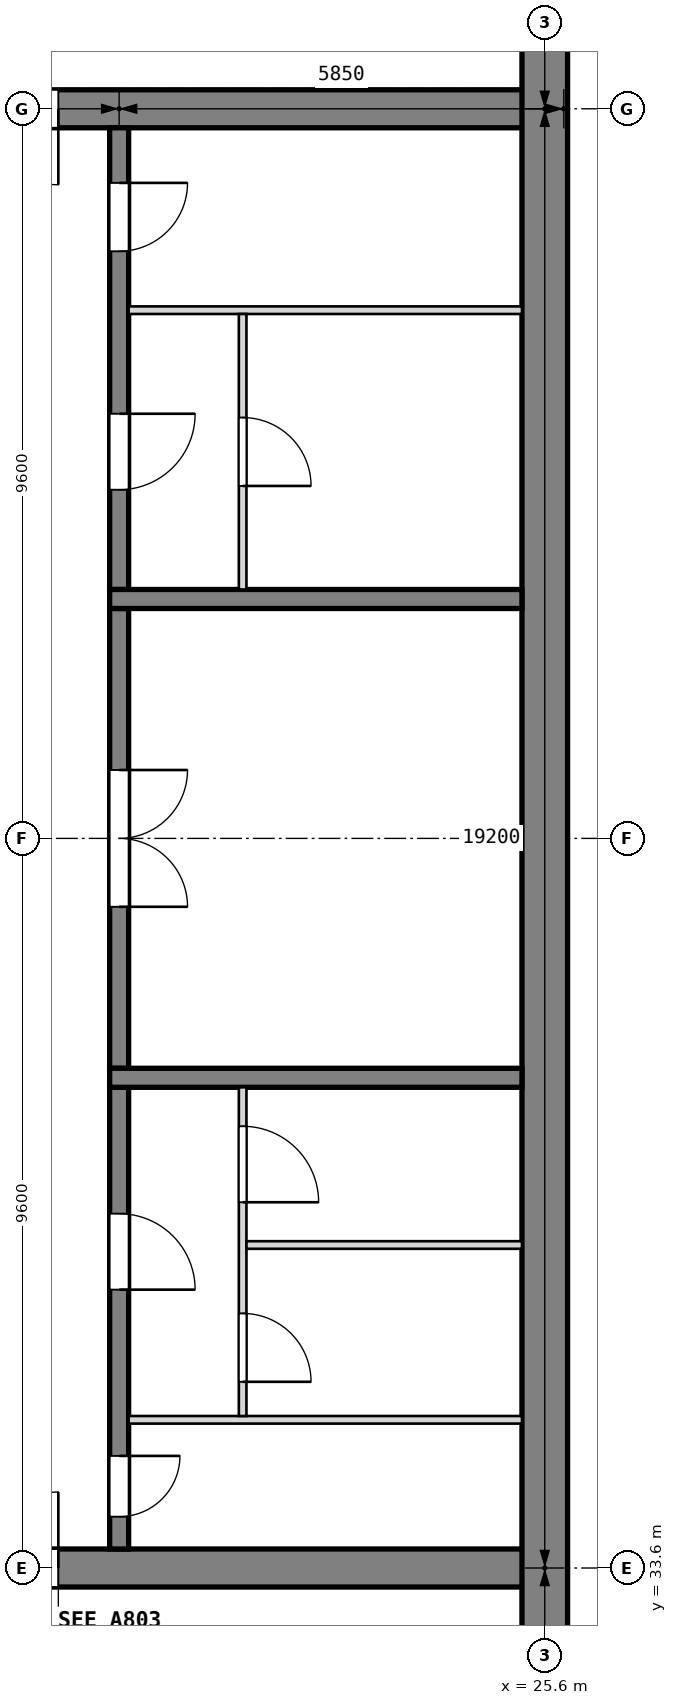
"""IFC4 building model, lengths in metres.
Left out: names, types, materials, properties, quantities, classifications, styles, units other than length and angle.
Written with IfcOpenShell. Run it as: python <this file> out.ifc"""

import sys

from ifc_helpers import new_model, si_unit, direction, frame, frame_2d, origin, place, context, subcontext, project, spatial, rectangle, extrude, element, fill, save


model = new_model("IFC4")
c1 = context("Model", 3, precision=1e-05, world=origin(), true_north=direction((0.0, 1.0)))
c2 = subcontext(c1, "Body", "Model", "MODEL_VIEW")
j1 = project(units=[si_unit("LENGTHUNIT", "METRE"), si_unit("PLANEANGLEUNIT", "RADIAN")], contexts=[c1])
p1 = place(None, origin())
s1 = spatial("IfcSite", under=j1, at=p1, CompositionType="ELEMENT")
p2 = place(p1, origin())
s2 = spatial("IfcBuilding", under=s1, at=p2, CompositionType="ELEMENT")
p3 = place(p2, frame((0.0, 0.0, 4.2)))
s3 = spatial("IfcBuildingStorey", under=s2, at=p3, CompositionType="ELEMENT", Elevation=4.2)
p4 = place(p3, frame((12.55, 52.8, 0.0), z_axis=(0.0, 0.0, 1.0), x_axis=(1.0, 0.0, 0.0)))
e1 = element("IfcWall", 1, at=p4, inside=s3, PredefinedType="SHEAR", context=c2, shape_type="SweptSolid", body=[
    extrude(rectangle(XDim=13.3, YDim=0.5, at=frame_2d((6.65, 0.0))), origin(), (0.0, 0.0, 1.0), 4.2),
])
p5 = place(p4, frame((4.65, 0.0, 0.0)))
e2 = element("IfcOpeningElement", 2, at=p5, cuts=e1, PredefinedType="OPENING", context=c2, shape_type="SweptSolid", body=[
    extrude(rectangle(XDim=2.0, YDim=2.1, at=frame_2d((1.0, 1.05))), frame((0.0, 0.26, 0.0), z_axis=(0.0, -1.0, 0.0), x_axis=(1.0, 0.0, 0.0)), (0.0, 0.0, 1.0), 0.52),
])
p6 = place(p3, frame((12.55, 33.6, 0.0), z_axis=(0.0, 0.0, 1.0), x_axis=(1.0, 0.0, 0.0)))
e3 = element("IfcWall", 3, at=p6, inside=s3, PredefinedType="SHEAR", context=c2, shape_type="SweptSolid", body=[
    extrude(rectangle(XDim=13.3, YDim=0.5, at=frame_2d((6.65, 0.0))), origin(), (0.0, 0.0, 1.0), 4.2),
])
p7 = place(p6, frame((4.65, 0.0, 0.0)))
e4 = element("IfcOpeningElement", 4, at=p7, cuts=e3, PredefinedType="OPENING", context=c2, shape_type="SweptSolid", body=[
    extrude(rectangle(XDim=2.0, YDim=2.1, at=frame_2d((1.0, 1.05))), frame((0.0, 0.26, 0.0), z_axis=(0.0, -1.0, 0.0), x_axis=(1.0, 0.0, 0.0)), (0.0, 0.0, 1.0), 0.52),
])
p8 = place(p3, frame((25.6, 28.8, 0.0), z_axis=(0.0, 0.0, 1.0), x_axis=(0.0, 1.0, 0.0)))
e5 = element("IfcWall", 5, at=p8, inside=s3, PredefinedType="SHEAR", context=c2, shape_type="SweptSolid", body=[
    extrude(rectangle(XDim=28.8, YDim=0.6, at=frame_2d((14.4, 0.0))), origin(), (0.0, 0.0, 1.0), 4.2),
])
p9 = place(p3, frame((20.0, 33.85, 0.0), z_axis=(0.0, 0.0, 1.0), x_axis=(0.0, 1.0, 0.0)))
e6 = element("IfcWall", 6, at=p9, inside=s3, PredefinedType="SOLIDWALL", context=c2, shape_type="SweptSolid", body=[
    extrude(rectangle(XDim=6.075, YDim=0.25, at=frame_2d((3.038, 0.0))), origin(), (0.0, 0.0, 1.0), 3.9),
])
p10 = place(p9, frame((0.425, 0.0, 0.0)))
e7 = element("IfcOpeningElement", 7, at=p10, cuts=e6, PredefinedType="OPENING", context=c2, shape_type="SweptSolid", body=[
    extrude(rectangle(XDim=0.8, YDim=2.1, at=frame_2d((0.4, 1.05))), frame((0.0, 0.135, 0.0), z_axis=(0.0, -1.0, 0.0), x_axis=(1.0, 0.0, 0.0)), (0.0, 0.0, 1.0), 0.27),
])
p11 = place(p9, frame((3.413, 0.0, 0.0)))
e8 = element("IfcOpeningElement", 8, at=p11, cuts=e6, PredefinedType="OPENING", context=c2, shape_type="SweptSolid", body=[
    extrude(rectangle(XDim=1.0, YDim=2.1, at=frame_2d((0.5, 1.05))), frame((0.0, 0.135, 0.0), z_axis=(0.0, -1.0, 0.0), x_axis=(1.0, 0.0, 0.0)), (0.0, 0.0, 1.0), 0.27),
])
p12 = place(p3, frame((20.0, 40.175, 0.0), z_axis=(0.0, 0.0, 1.0), x_axis=(0.0, 1.0, 0.0)))
e9 = element("IfcWall", 9, at=p12, inside=s3, PredefinedType="SOLIDWALL", context=c2, shape_type="SweptSolid", body=[
    extrude(rectangle(XDim=6.05, YDim=0.25, at=frame_2d((3.025, 0.0))), origin(), (0.0, 0.0, 1.0), 3.9),
])
p13 = place(p12, frame((2.125, 0.0, 0.0)))
e10 = element("IfcOpeningElement", 10, at=p13, cuts=e9, PredefinedType="OPENING", context=c2, shape_type="SweptSolid", body=[
    extrude(rectangle(XDim=1.8, YDim=2.1, at=frame_2d((0.9, 1.05))), frame((0.0, 0.135, 0.0), z_axis=(0.0, -1.0, 0.0), x_axis=(1.0, 0.0, 0.0)), (0.0, 0.0, 1.0), 0.27),
])
p14 = place(p3, frame((20.0, 46.475, 0.0), z_axis=(0.0, 0.0, 1.0), x_axis=(0.0, 1.0, 0.0)))
e11 = element("IfcWall", 11, at=p14, inside=s3, PredefinedType="SOLIDWALL", context=c2, shape_type="SweptSolid", body=[
    extrude(rectangle(XDim=6.075, YDim=0.25, at=frame_2d((3.038, 0.0))), origin(), (0.0, 0.0, 1.0), 3.9),
])
p15 = place(p14, frame((1.312, 0.0, 0.0)))
e12 = element("IfcOpeningElement", 12, at=p15, cuts=e11, PredefinedType="OPENING", context=c2, shape_type="SweptSolid", body=[
    extrude(rectangle(XDim=1.0, YDim=2.1, at=frame_2d((0.5, 1.05))), frame((0.0, 0.135, 0.0), z_axis=(0.0, -1.0, 0.0), x_axis=(1.0, 0.0, 0.0)), (0.0, 0.0, 1.0), 0.27),
])
p16 = place(p14, frame((4.45, 0.0, 0.0)))
e13 = element("IfcOpeningElement", 13, at=p16, cuts=e11, PredefinedType="OPENING", context=c2, shape_type="SweptSolid", body=[
    extrude(rectangle(XDim=0.9, YDim=2.1, at=frame_2d((0.45, 1.05))), frame((0.0, 0.135, 0.0), z_axis=(0.0, -1.0, 0.0), x_axis=(1.0, 0.0, 0.0)), (0.0, 0.0, 1.0), 0.27),
])
for number, where, z_axis, x_axis in (
    (14, (19.875, 40.05, 0.0), (0.0, 0.0, 1.0), (1.0, 0.0, 0.0)),
    (15, (19.875, 46.35, 0.0), (0.0, 0.0, 1.0), (1.0, 0.0, 0.0)),
):
    element("IfcWall", number, at=place(p3, frame(where, z_axis=z_axis, x_axis=x_axis)), inside=s3, PredefinedType="SOLIDWALL", context=c2, shape_type="SweptSolid", body=[
        extrude(rectangle(XDim=5.425, YDim=0.25, at=frame_2d((2.712, 0.0))), origin(), (0.0, 0.0, 1.0), 3.9),
    ])
p17 = place(p3, frame((20.125, 35.55, 0.0), z_axis=(0.0, 0.0, 1.0), x_axis=(1.0, 0.0, 0.0)))
e16 = element("IfcWall", 16, at=p17, inside=s3, PredefinedType="PARTITIONING", context=c2, shape_type="SweptSolid", body=[
    extrude(rectangle(XDim=5.175, YDim=0.1, at=frame_2d((2.587, 0.0))), origin(), (0.0, 0.0, 1.0), 3.9),
])
p18 = place(p3, frame((21.625, 35.6, 0.0), z_axis=(0.0, 0.0, 1.0), x_axis=(0.0, 1.0, 0.0)))
e17 = element("IfcWall", 17, at=p18, inside=s3, PredefinedType="PARTITIONING", context=c2, shape_type="SweptSolid", body=[
    extrude(rectangle(XDim=4.325, YDim=0.1, at=frame_2d((2.163, 0.0))), origin(), (0.0, 0.0, 1.0), 3.9),
])
p19 = place(p18, frame((0.45, 0.0, 0.0)))
e18 = element("IfcOpeningElement", 18, at=p19, cuts=e17, PredefinedType="OPENING", context=c2, shape_type="SweptSolid", body=[
    extrude(rectangle(XDim=0.9, YDim=2.1, at=frame_2d((0.45, 1.05))), frame((0.0, 0.06, 0.0), z_axis=(0.0, -1.0, 0.0), x_axis=(1.0, 0.0, 0.0)), (0.0, 0.0, 1.0), 0.12),
])
p20 = place(p18, frame((2.812, 0.0, 0.0)))
e19 = element("IfcOpeningElement", 19, at=p20, cuts=e17, PredefinedType="OPENING", context=c2, shape_type="SweptSolid", body=[
    extrude(rectangle(XDim=1.0, YDim=2.1, at=frame_2d((0.5, 1.05))), frame((0.0, 0.06, 0.0), z_axis=(0.0, -1.0, 0.0), x_axis=(1.0, 0.0, 0.0)), (0.0, 0.0, 1.0), 0.12),
])
p21 = place(p3, frame((21.675, 37.85, 0.0), z_axis=(0.0, 0.0, 1.0), x_axis=(1.0, 0.0, 0.0)))
e20 = element("IfcWall", 20, at=p21, inside=s3, PredefinedType="PARTITIONING", context=c2, shape_type="SweptSolid", body=[
    extrude(rectangle(XDim=3.625, YDim=0.1, at=frame_2d((1.812, 0.0))), origin(), (0.0, 0.0, 1.0), 3.9),
])
p22 = place(p3, frame((20.125, 50.15, 0.0), z_axis=(0.0, 0.0, 1.0), x_axis=(1.0, 0.0, 0.0)))
e21 = element("IfcWall", 21, at=p22, inside=s3, PredefinedType="PARTITIONING", context=c2, shape_type="SweptSolid", body=[
    extrude(rectangle(XDim=5.175, YDim=0.1, at=frame_2d((2.587, 0.0))), origin(), (0.0, 0.0, 1.0), 3.9),
])
p23 = place(p3, frame((21.625, 46.475, 0.0), z_axis=(0.0, 0.0, 1.0), x_axis=(0.0, 1.0, 0.0)))
e22 = element("IfcWall", 22, at=p23, inside=s3, PredefinedType="PARTITIONING", context=c2, shape_type="SweptSolid", body=[
    extrude(rectangle(XDim=3.625, YDim=0.1, at=frame_2d((1.812, 0.0))), origin(), (0.0, 0.0, 1.0), 3.9),
])
p24 = place(p23, frame((1.363, 0.0, 0.0)))
e23 = element("IfcOpeningElement", 23, at=p24, cuts=e22, PredefinedType="OPENING", context=c2, shape_type="SweptSolid", body=[
    extrude(rectangle(XDim=0.9, YDim=2.1, at=frame_2d((0.45, 1.05))), frame((0.0, 0.06, 0.0), z_axis=(0.0, -1.0, 0.0), x_axis=(1.0, 0.0, 0.0)), (0.0, 0.0, 1.0), 0.12),
])
p25 = place(p13, frame((1.8, 0.0, 0.0), z_axis=(0.0, 0.0, 1.0), x_axis=(-1.0, 0.0, 0.0)))
e24 = element("IfcDoor", 24, at=p25, inside=s3, OperationType="DOUBLE_DOOR_SINGLE_SWING", PredefinedType="DOOR", context=c2, shape_type="SweptSolid", body=[
    extrude(rectangle(XDim=1.8, YDim=2.1, at=frame_2d((0.9, 1.05))), frame((0.0, 0.025, 0.0), z_axis=(0.0, -1.0, 0.0), x_axis=(1.0, 0.0, 0.0)), (0.0, 0.0, 1.0), 0.05),
])
fill(e10, e24)
p26 = place(p10, frame((0.8, 0.0, 0.0), z_axis=(0.0, 0.0, 1.0), x_axis=(-1.0, 0.0, 0.0)))
e25 = element("IfcDoor", 25, at=p26, inside=s3, OperationType="SINGLE_SWING_LEFT", PredefinedType="DOOR", context=c2, shape_type="SweptSolid", body=[
    extrude(rectangle(XDim=0.8, YDim=2.1, at=frame_2d((0.4, 1.05))), frame((0.0, 0.025, 0.0), z_axis=(0.0, -1.0, 0.0), x_axis=(1.0, 0.0, 0.0)), (0.0, 0.0, 1.0), 0.05),
])
fill(e7, e25)
p27 = place(p11, frame((1.0, 0.0, 0.0), z_axis=(0.0, 0.0, 1.0), x_axis=(-1.0, 0.0, 0.0)))
e26 = element("IfcDoor", 26, at=p27, inside=s3, OperationType="SINGLE_SWING_RIGHT", PredefinedType="DOOR", context=c2, shape_type="SweptSolid", body=[
    extrude(rectangle(XDim=1.0, YDim=2.1, at=frame_2d((0.5, 1.05))), frame((0.0, 0.025, 0.0), z_axis=(0.0, -1.0, 0.0), x_axis=(1.0, 0.0, 0.0)), (0.0, 0.0, 1.0), 0.05),
])
fill(e8, e26)
p28 = place(p19, frame((0.9, 0.0, 0.0), z_axis=(0.0, 0.0, 1.0), x_axis=(-1.0, 0.0, 0.0)))
e27 = element("IfcDoor", 27, at=p28, inside=s3, OperationType="SINGLE_SWING_RIGHT", PredefinedType="DOOR", context=c2, shape_type="SweptSolid", body=[
    extrude(rectangle(XDim=0.9, YDim=2.1, at=frame_2d((0.45, 1.05))), frame((0.0, 0.025, 0.0), z_axis=(0.0, -1.0, 0.0), x_axis=(1.0, 0.0, 0.0)), (0.0, 0.0, 1.0), 0.05),
])
fill(e18, e27)
p29 = place(p20, frame((1.0, 0.0, 0.0), z_axis=(0.0, 0.0, 1.0), x_axis=(-1.0, 0.0, 0.0)))
e28 = element("IfcDoor", 28, at=p29, inside=s3, OperationType="SINGLE_SWING_RIGHT", PredefinedType="DOOR", context=c2, shape_type="SweptSolid", body=[
    extrude(rectangle(XDim=1.0, YDim=2.1, at=frame_2d((0.5, 1.05))), frame((0.0, 0.025, 0.0), z_axis=(0.0, -1.0, 0.0), x_axis=(1.0, 0.0, 0.0)), (0.0, 0.0, 1.0), 0.05),
])
fill(e19, e28)
p30 = place(p15, frame((1.0, 0.0, 0.0), z_axis=(0.0, 0.0, 1.0), x_axis=(-1.0, 0.0, 0.0)))
e29 = element("IfcDoor", 29, at=p30, inside=s3, OperationType="SINGLE_SWING_LEFT", PredefinedType="DOOR", context=c2, shape_type="SweptSolid", body=[
    extrude(rectangle(XDim=1.0, YDim=2.1, at=frame_2d((0.5, 1.05))), frame((0.0, 0.025, 0.0), z_axis=(0.0, -1.0, 0.0), x_axis=(1.0, 0.0, 0.0)), (0.0, 0.0, 1.0), 0.05),
])
fill(e12, e29)
p31 = place(p24, frame((0.9, 0.0, 0.0), z_axis=(0.0, 0.0, 1.0), x_axis=(-1.0, 0.0, 0.0)))
e30 = element("IfcDoor", 30, at=p31, inside=s3, OperationType="SINGLE_SWING_RIGHT", PredefinedType="DOOR", context=c2, shape_type="SweptSolid", body=[
    extrude(rectangle(XDim=0.9, YDim=2.1, at=frame_2d((0.45, 1.05))), frame((0.0, 0.025, 0.0), z_axis=(0.0, -1.0, 0.0), x_axis=(1.0, 0.0, 0.0)), (0.0, 0.0, 1.0), 0.05),
])
fill(e23, e30)
p32 = place(p16, frame((0.9, 0.0, 0.0), z_axis=(0.0, 0.0, 1.0), x_axis=(-1.0, 0.0, 0.0)))
e31 = element("IfcDoor", 31, at=p32, inside=s3, OperationType="SINGLE_SWING_LEFT", PredefinedType="DOOR", context=c2, shape_type="SweptSolid", body=[
    extrude(rectangle(XDim=0.9, YDim=2.1, at=frame_2d((0.45, 1.05))), frame((0.0, 0.025, 0.0), z_axis=(0.0, -1.0, 0.0), x_axis=(1.0, 0.0, 0.0)), (0.0, 0.0, 1.0), 0.05),
])
fill(e13, e31)
p33 = place(p7, origin())
e32 = element("IfcDoor", 32, at=p33, inside=s3, OperationType="DOUBLE_DOOR_SINGLE_SWING", PredefinedType="DOOR", context=c2, shape_type="SweptSolid", body=[
    extrude(rectangle(XDim=2.0, YDim=2.1, at=frame_2d((1.0, 1.05))), frame((0.0, 0.025, 0.0), z_axis=(0.0, -1.0, 0.0), x_axis=(1.0, 0.0, 0.0)), (0.0, 0.0, 1.0), 0.05),
])
fill(e4, e32)
p34 = place(p5, frame((2.0, 0.0, 0.0), z_axis=(0.0, 0.0, 1.0), x_axis=(-1.0, 0.0, 0.0)))
e33 = element("IfcDoor", 33, at=p34, inside=s3, OperationType="DOUBLE_DOOR_SINGLE_SWING", PredefinedType="DOOR", context=c2, shape_type="SweptSolid", body=[
    extrude(rectangle(XDim=2.0, YDim=2.1, at=frame_2d((1.0, 1.05))), frame((0.0, 0.025, 0.0), z_axis=(0.0, -1.0, 0.0), x_axis=(1.0, 0.0, 0.0)), (0.0, 0.0, 1.0), 0.05),
])
fill(e2, e33)
save(model, sys.argv[1])
